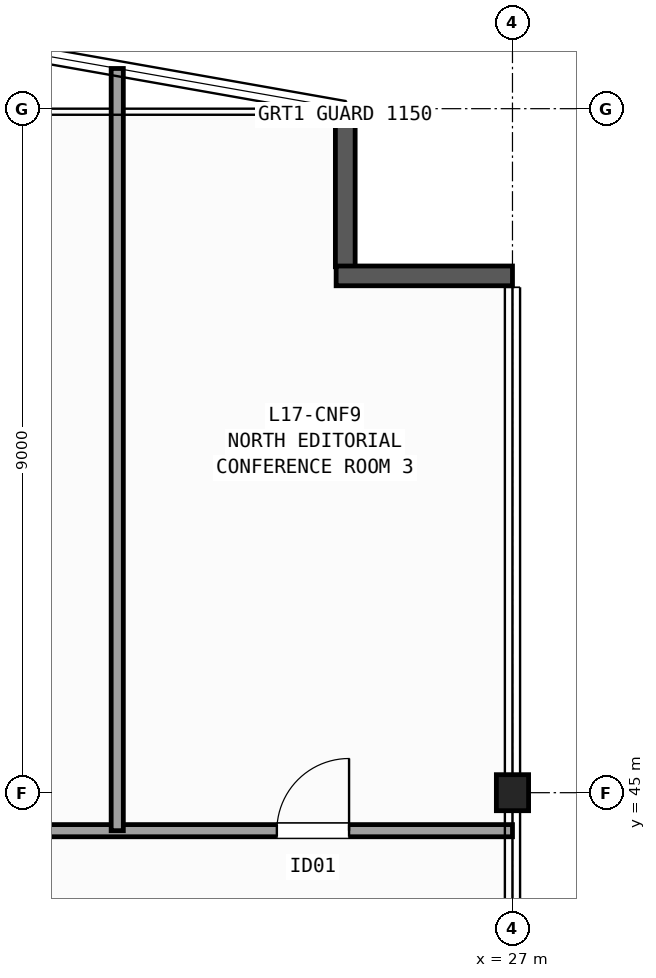
"""IFC4 building model, lengths in metres.
Left out: names, types, materials, properties, quantities, classifications, styles, units other than length and angle.
Written with IfcOpenShell. Run it as: python <this file> out.ifc"""

import sys

from ifc_helpers import new_model, si_unit, direction, frame, frame_2d, origin, origin_2d, place, context, subcontext, project, spatial, rectangle, i_section, extrude, element, fill, save


model = new_model("IFC4")
c1 = context("Model", 3, precision=1e-05, world=origin(), true_north=direction((0.0, 1.0)))
c2 = subcontext(c1, "Body", "Model", "MODEL_VIEW")
j1 = project(units=[si_unit("LENGTHUNIT", "METRE"), si_unit("PLANEANGLEUNIT", "RADIAN")], contexts=[c1])
p1 = place(None, origin())
s1 = spatial("IfcSite", under=j1, at=p1, CompositionType="ELEMENT")
p2 = place(p1, origin())
s2 = spatial("IfcBuilding", under=s1, at=p2, CompositionType="ELEMENT")
p3 = place(p2, frame((0.0, 0.0, 73.0)))
s3 = spatial("IfcBuildingStorey", under=s2, at=p3, CompositionType="ELEMENT", Elevation=73.0)
p4 = place(p3, frame((27.0, 45.0, 0.0), z_axis=(0.0, 0.0, 1.0), x_axis=(1.0, 0.0, 0.0)))
e1 = element("IfcColumn", 1, at=p4, inside=s3, PredefinedType="COLUMN", context=c2, shape_type="SweptSolid", body=[
    extrude(i_section(OverallWidth=0.424, OverallDepth=0.474, WebThickness=0.048, FlangeThickness=0.077, FilletRadius=0.015, at=origin_2d()), origin(), (0.0, 0.0, 1.0), 3.7),
])
p5 = place(p3, frame((24.8, 54.0, 0.0), z_axis=(0.0, 0.0, 1.0), x_axis=(0.0, -1.0, 0.0)))
e2 = element("IfcWall", 2, at=p5, inside=s3, PredefinedType="SOLIDWALL", context=c2, shape_type="SweptSolid", body=[
    extrude(rectangle(XDim=2.08, YDim=0.26, at=frame_2d((1.04, 0.0))), origin(), (0.0, 0.0, 1.0), 3.42),
])
p6 = place(p3, frame((24.68, 51.8, 0.0), z_axis=(0.0, 0.0, 1.0), x_axis=(1.0, 0.0, 0.0)))
e3 = element("IfcWall", 3, at=p6, inside=s3, PredefinedType="SOLIDWALL", context=c2, shape_type="SweptSolid", body=[
    extrude(rectangle(XDim=2.32, YDim=0.26, at=frame_2d((1.16, 0.0))), origin(), (0.0, 0.0, 1.0), 3.42),
])
p7 = place(p3, frame((9.0, 44.5, 0.0), z_axis=(0.0, 0.0, 1.0), x_axis=(1.0, 0.0, 0.0)))
e4 = element("IfcWall", 4, at=p7, inside=s3, PredefinedType="PARTITIONING", context=c2, shape_type="SweptSolid", body=[
    extrude(rectangle(XDim=18.0, YDim=0.16, at=frame_2d((9.0, 0.0))), origin(), (0.0, 0.0, 1.0), 2.627),
])
p8 = place(p7, frame((7.3, 0.0, 0.0)))
e5 = element("IfcOpeningElement", 5, at=p8, cuts=e4, PredefinedType="OPENING", context=c2, shape_type="SweptSolid", body=[
    extrude(rectangle(XDim=0.86, YDim=2.05, at=frame_2d((0.43, 1.025))), frame((0.0, 0.09, 0.0), z_axis=(0.0, -1.0, 0.0), x_axis=(1.0, 0.0, 0.0)), (0.0, 0.0, 1.0), 0.18),
])
p9 = place(p7, frame((14.9, 0.0, 0.0)))
e6 = element("IfcOpeningElement", 6, at=p9, cuts=e4, PredefinedType="OPENING", context=c2, shape_type="SweptSolid", body=[
    extrude(rectangle(XDim=0.95, YDim=2.1, at=frame_2d((0.475, 1.05))), frame((0.0, 0.09, 0.0), z_axis=(0.0, -1.0, 0.0), x_axis=(1.0, 0.0, 0.0)), (0.0, 0.0, 1.0), 0.18),
])
p10 = place(p3, frame((21.8, 44.5, 0.0), z_axis=(0.0, 0.0, 1.0), x_axis=(0.0, 1.0, 0.0)))
e7 = element("IfcWall", 7, at=p10, inside=s3, PredefinedType="PARTITIONING", context=c2, shape_type="SweptSolid", body=[
    extrude(rectangle(XDim=10.029, YDim=0.16, at=frame_2d((5.015, 0.0))), origin(), (0.0, 0.0, 1.0), 3.42),
])
p11 = place(p9, origin())
e8 = element("IfcDoor", 8, at=p11, inside=s3, OperationType="SINGLE_SWING_RIGHT", PredefinedType="DOOR", context=c2, shape_type="SweptSolid", body=[
    extrude(rectangle(XDim=0.95, YDim=2.1, at=frame_2d((0.475, 1.05))), frame((0.0, 0.025, 0.0), z_axis=(0.0, -1.0, 0.0), x_axis=(1.0, 0.0, 0.0)), (0.0, 0.0, 1.0), 0.05),
])
fill(e6, e8)
save(model, sys.argv[1])
